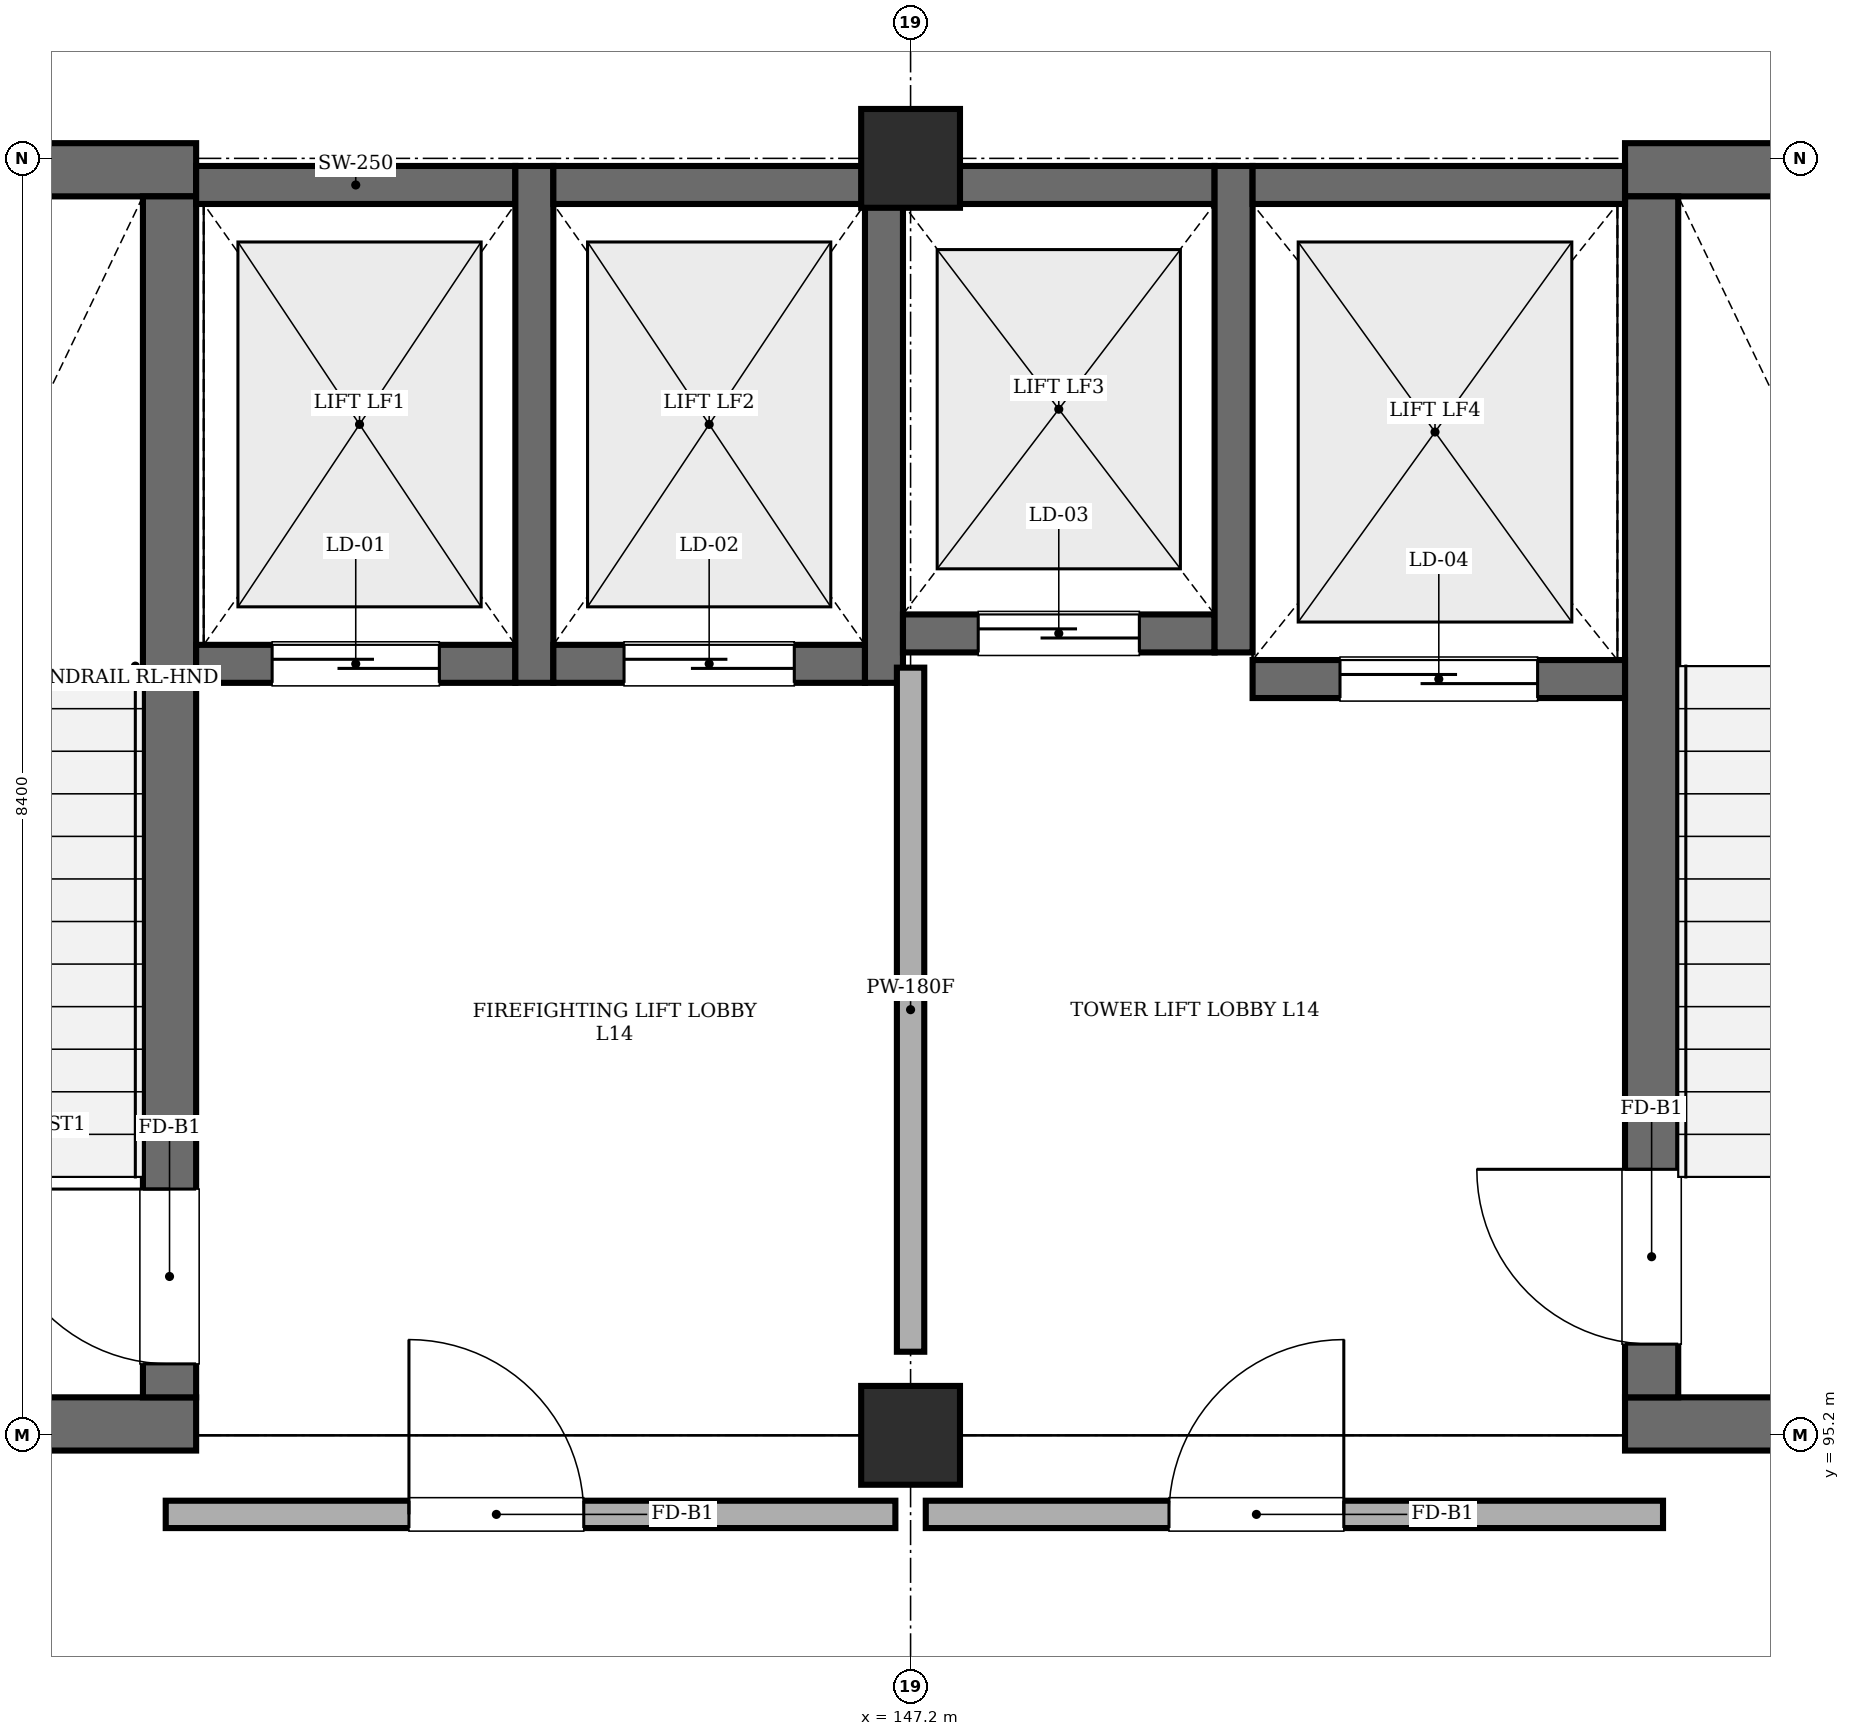
"""IFC4 building model, lengths in metres.
Left out: names, types, materials, properties, quantities, classifications, styles, units other than length and angle.
Written with IfcOpenShell. Run it as: python <this file> out.ifc"""

import sys

from ifc_helpers import new_model, si_unit, direction, frame, frame_2d, origin, origin_2d, place, context, subcontext, project, spatial, rectangle, extrude, element, fill, save


model = new_model("IFC4")
c1 = context("Model", 3, precision=1e-05, world=origin(), true_north=direction((0.0, 1.0)))
c2 = subcontext(c1, "Body", "Model", "MODEL_VIEW")
j1 = project(units=[si_unit("LENGTHUNIT", "METRE"), si_unit("PLANEANGLEUNIT", "RADIAN")], contexts=[c1])
p1 = place(None, origin())
s1 = spatial("IfcSite", under=j1, at=p1, CompositionType="ELEMENT")
p2 = place(p1, origin())
s2 = spatial("IfcBuilding", under=s1, at=p2, CompositionType="ELEMENT")
p3 = place(p2, frame((0.0, 0.0, 57.0)))
s3 = spatial("IfcBuildingStorey", under=s2, at=p3, CompositionType="ELEMENT", Elevation=57.0)
for number, where, z_axis, x_axis in (
    (1, (147.2, 95.2, 0.0), (0.0, 0.0, 1.0), (1.0, 0.0, 0.0)),
    (2, (147.2, 103.6, 0.0), (0.0, 0.0, 1.0), (1.0, 0.0, 0.0)),
):
    element("IfcColumn", number, at=place(p3, frame(where, z_axis=z_axis, x_axis=x_axis)), inside=s3, PredefinedType="COLUMN", context=c2, shape_type="SweptSolid", body=[
        extrude(rectangle(XDim=0.65, YDim=0.65, at=origin_2d()), origin(), (0.0, 0.0, 1.0), 4.02),
    ])
for number, where, z_axis, x_axis in (
    (3, (138.7, 95.275, 0.0), (0.0, 0.0, 1.0), (1.0, 0.0, 0.0)),
    (4, (138.7, 103.525, 0.0), (0.0, 0.0, 1.0), (1.0, 0.0, 0.0)),
):
    element("IfcWall", number, at=place(p3, frame(where, z_axis=z_axis, x_axis=x_axis)), inside=s3, PredefinedType="SHEAR", context=c2, shape_type="SweptSolid", body=[
        extrude(rectangle(XDim=3.8, YDim=0.35, at=frame_2d((1.9, 0.0))), origin(), (0.0, 0.0, 1.0), 4.02),
    ])
p4 = place(p3, frame((142.325, 95.45, 0.0), z_axis=(0.0, 0.0, 1.0), x_axis=(0.0, 1.0, 0.0)))
e5 = element("IfcWall", 5, at=p4, inside=s3, PredefinedType="SHEAR", context=c2, shape_type="SweptSolid", body=[
    extrude(rectangle(XDim=7.9, YDim=0.35, at=frame_2d((3.95, 0.0))), origin(), (0.0, 0.0, 1.0), 4.02),
])
p5 = place(p4, frame((0.22, 0.0, 0.0)))
e6 = element("IfcOpeningElement", 6, at=p5, cuts=e5, PredefinedType="OPENING", context=c2, shape_type="SweptSolid", body=[
    extrude(rectangle(XDim=1.15, YDim=2.15, at=frame_2d((0.575, 1.075))), frame((0.0, 0.185, 0.0), z_axis=(0.0, -1.0, 0.0), x_axis=(1.0, 0.0, 0.0)), (0.0, 0.0, 1.0), 0.37),
])
for number, where, z_axis, x_axis in (
    (7, (151.9, 95.275, 0.0), (0.0, 0.0, 1.0), (1.0, 0.0, 0.0)),
    (8, (151.9, 103.525, 0.0), (0.0, 0.0, 1.0), (1.0, 0.0, 0.0)),
):
    element("IfcWall", number, at=place(p3, frame(where, z_axis=z_axis, x_axis=x_axis)), inside=s3, PredefinedType="SHEAR", context=c2, shape_type="SweptSolid", body=[
        extrude(rectangle(XDim=3.8, YDim=0.35, at=frame_2d((1.9, 0.0))), origin(), (0.0, 0.0, 1.0), 4.02),
    ])
p6 = place(p3, frame((152.075, 95.45, 0.0), z_axis=(0.0, 0.0, 1.0), x_axis=(0.0, 1.0, 0.0)))
e9 = element("IfcWall", 9, at=p6, inside=s3, PredefinedType="SHEAR", context=c2, shape_type="SweptSolid", body=[
    extrude(rectangle(XDim=7.9, YDim=0.35, at=frame_2d((3.95, 0.0))), origin(), (0.0, 0.0, 1.0), 4.02),
])
p7 = place(p6, frame((0.35, 0.0, 0.0)))
e10 = element("IfcOpeningElement", 10, at=p7, cuts=e9, PredefinedType="OPENING", context=c2, shape_type="SweptSolid", body=[
    extrude(rectangle(XDim=1.15, YDim=2.15, at=frame_2d((0.575, 1.075))), frame((0.0, 0.185, 0.0), z_axis=(0.0, -1.0, 0.0), x_axis=(1.0, 0.0, 0.0)), (0.0, 0.0, 1.0), 0.37),
])
p8 = place(p3, frame((142.5, 100.275, 0.0), z_axis=(0.0, 0.0, 1.0), x_axis=(1.0, 0.0, 0.0)))
e11 = element("IfcWall", 11, at=p8, inside=s3, PredefinedType="SHEAR", context=c2, shape_type="SweptSolid", body=[
    extrude(rectangle(XDim=2.1, YDim=0.25, at=frame_2d((1.05, 0.0))), origin(), (0.0, 0.0, 1.0), 4.02),
])
p9 = place(p8, frame((0.5, 0.0, 0.0)))
e12 = element("IfcOpeningElement", 12, at=p9, cuts=e11, PredefinedType="OPENING", context=c2, shape_type="SweptSolid", body=[
    extrude(rectangle(XDim=1.1, YDim=2.15, at=frame_2d((0.55, 1.075))), frame((0.0, 0.135, 0.0), z_axis=(0.0, -1.0, 0.0), x_axis=(1.0, 0.0, 0.0)), (0.0, 0.0, 1.0), 0.27),
])
p10 = place(p3, frame((142.5, 103.425, 0.0), z_axis=(0.0, 0.0, 1.0), x_axis=(1.0, 0.0, 0.0)))
e13 = element("IfcWall", 13, at=p10, inside=s3, PredefinedType="SHEAR", context=c2, shape_type="SweptSolid", body=[
    extrude(rectangle(XDim=2.1, YDim=0.25, at=frame_2d((1.05, 0.0))), origin(), (0.0, 0.0, 1.0), 4.02),
])
p11 = place(p3, frame((144.725, 100.15, 0.0), z_axis=(0.0, 0.0, 1.0), x_axis=(0.0, 1.0, 0.0)))
e14 = element("IfcWall", 14, at=p11, inside=s3, PredefinedType="SHEAR", context=c2, shape_type="SweptSolid", body=[
    extrude(rectangle(XDim=3.4, YDim=0.25, at=frame_2d((1.7, 0.0))), origin(), (0.0, 0.0, 1.0), 4.02),
])
p12 = place(p3, frame((144.85, 100.275, 0.0), z_axis=(0.0, 0.0, 1.0), x_axis=(1.0, 0.0, 0.0)))
e15 = element("IfcWall", 15, at=p12, inside=s3, PredefinedType="SHEAR", context=c2, shape_type="SweptSolid", body=[
    extrude(rectangle(XDim=2.05, YDim=0.25, at=frame_2d((1.025, 0.0))), origin(), (0.0, 0.0, 1.0), 4.02),
])
p13 = place(p12, frame((0.465, 0.0, 0.0)))
e16 = element("IfcOpeningElement", 16, at=p13, cuts=e15, PredefinedType="OPENING", context=c2, shape_type="SweptSolid", body=[
    extrude(rectangle(XDim=1.12, YDim=2.15, at=frame_2d((0.56, 1.075))), frame((0.0, 0.135, 0.0), z_axis=(0.0, -1.0, 0.0), x_axis=(1.0, 0.0, 0.0)), (0.0, 0.0, 1.0), 0.27),
])
p14 = place(p3, frame((144.85, 103.425, 0.0), z_axis=(0.0, 0.0, 1.0), x_axis=(1.0, 0.0, 0.0)))
e17 = element("IfcWall", 17, at=p14, inside=s3, PredefinedType="SHEAR", context=c2, shape_type="SweptSolid", body=[
    extrude(rectangle(XDim=2.05, YDim=0.25, at=frame_2d((1.025, 0.0))), origin(), (0.0, 0.0, 1.0), 4.02),
])
p15 = place(p3, frame((147.025, 100.15, 0.0), z_axis=(0.0, 0.0, 1.0), x_axis=(0.0, 1.0, 0.0)))
e18 = element("IfcWall", 18, at=p15, inside=s3, PredefinedType="SHEAR", context=c2, shape_type="SweptSolid", body=[
    extrude(rectangle(XDim=3.4, YDim=0.25, at=frame_2d((1.7, 0.0))), origin(), (0.0, 0.0, 1.0), 4.02),
])
p16 = place(p3, frame((147.15, 100.475, 0.0), z_axis=(0.0, 0.0, 1.0), x_axis=(1.0, 0.0, 0.0)))
e19 = element("IfcWall", 19, at=p16, inside=s3, PredefinedType="SHEAR", context=c2, shape_type="SweptSolid", body=[
    extrude(rectangle(XDim=2.05, YDim=0.25, at=frame_2d((1.025, 0.0))), origin(), (0.0, 0.0, 1.0), 4.02),
])
p17 = place(p16, frame((0.495, 0.0, 0.0)))
e20 = element("IfcOpeningElement", 20, at=p17, cuts=e19, PredefinedType="OPENING", context=c2, shape_type="SweptSolid", body=[
    extrude(rectangle(XDim=1.06, YDim=2.15, at=frame_2d((0.53, 1.075))), frame((0.0, 0.135, 0.0), z_axis=(0.0, -1.0, 0.0), x_axis=(1.0, 0.0, 0.0)), (0.0, 0.0, 1.0), 0.27),
])
p18 = place(p3, frame((147.15, 103.425, 0.0), z_axis=(0.0, 0.0, 1.0), x_axis=(1.0, 0.0, 0.0)))
e21 = element("IfcWall", 21, at=p18, inside=s3, PredefinedType="SHEAR", context=c2, shape_type="SweptSolid", body=[
    extrude(rectangle(XDim=2.05, YDim=0.25, at=frame_2d((1.025, 0.0))), origin(), (0.0, 0.0, 1.0), 4.02),
])
p19 = place(p3, frame((149.325, 100.35, 0.0), z_axis=(0.0, 0.0, 1.0), x_axis=(0.0, 1.0, 0.0)))
e22 = element("IfcWall", 22, at=p19, inside=s3, PredefinedType="SHEAR", context=c2, shape_type="SweptSolid", body=[
    extrude(rectangle(XDim=3.2, YDim=0.25, at=frame_2d((1.6, 0.0))), origin(), (0.0, 0.0, 1.0), 4.02),
])
p20 = place(p3, frame((149.45, 100.175, 0.0), z_axis=(0.0, 0.0, 1.0), x_axis=(1.0, 0.0, 0.0)))
e23 = element("IfcWall", 23, at=p20, inside=s3, PredefinedType="SHEAR", context=c2, shape_type="SweptSolid", body=[
    extrude(rectangle(XDim=2.45, YDim=0.25, at=frame_2d((1.225, 0.0))), origin(), (0.0, 0.0, 1.0), 4.02),
])
p21 = place(p20, frame((0.575, 0.0, 0.0)))
e24 = element("IfcOpeningElement", 24, at=p21, cuts=e23, PredefinedType="OPENING", context=c2, shape_type="SweptSolid", body=[
    extrude(rectangle(XDim=1.3, YDim=2.25, at=frame_2d((0.65, 1.125))), frame((0.0, 0.135, 0.0), z_axis=(0.0, -1.0, 0.0), x_axis=(1.0, 0.0, 0.0)), (0.0, 0.0, 1.0), 0.27),
])
p22 = place(p3, frame((149.45, 103.425, 0.0), z_axis=(0.0, 0.0, 1.0), x_axis=(1.0, 0.0, 0.0)))
e25 = element("IfcWall", 25, at=p22, inside=s3, PredefinedType="SHEAR", context=c2, shape_type="SweptSolid", body=[
    extrude(rectangle(XDim=2.45, YDim=0.25, at=frame_2d((1.225, 0.0))), origin(), (0.0, 0.0, 1.0), 4.02),
])
p23 = place(p3, frame((142.3, 94.68, 0.0), z_axis=(0.0, 0.0, 1.0), x_axis=(1.0, 0.0, 0.0)))
e26 = element("IfcWall", 26, at=p23, inside=s3, PredefinedType="STANDARD", context=c2, shape_type="SweptSolid", body=[
    extrude(rectangle(XDim=4.8, YDim=0.18, at=frame_2d((2.4, 0.0))), origin(), (0.0, 0.0, 1.0), 4.02),
])
p24 = place(p23, frame((1.6, 0.0, 0.0)))
e27 = element("IfcOpeningElement", 27, at=p24, cuts=e26, PredefinedType="OPENING", context=c2, shape_type="SweptSolid", body=[
    extrude(rectangle(XDim=1.15, YDim=2.15, at=frame_2d((0.575, 1.075))), frame((0.0, 0.1, 0.0), z_axis=(0.0, -1.0, 0.0), x_axis=(1.0, 0.0, 0.0)), (0.0, 0.0, 1.0), 0.2),
])
p25 = place(p3, frame((147.3, 94.68, 0.0), z_axis=(0.0, 0.0, 1.0), x_axis=(1.0, 0.0, 0.0)))
e28 = element("IfcWall", 28, at=p25, inside=s3, PredefinedType="STANDARD", context=c2, shape_type="SweptSolid", body=[
    extrude(rectangle(XDim=4.85, YDim=0.18, at=frame_2d((2.425, 0.0))), origin(), (0.0, 0.0, 1.0), 4.02),
])
p26 = place(p25, frame((1.6, 0.0, 0.0)))
e29 = element("IfcOpeningElement", 29, at=p26, cuts=e28, PredefinedType="OPENING", context=c2, shape_type="SweptSolid", body=[
    extrude(rectangle(XDim=1.15, YDim=2.15, at=frame_2d((0.575, 1.075))), frame((0.0, 0.1, 0.0), z_axis=(0.0, -1.0, 0.0), x_axis=(1.0, 0.0, 0.0)), (0.0, 0.0, 1.0), 0.2),
])
p27 = place(p3, frame((147.2, 95.75, 0.0), z_axis=(0.0, 0.0, 1.0), x_axis=(0.0, 1.0, 0.0)))
e30 = element("IfcWall", 30, at=p27, inside=s3, PredefinedType="STANDARD", context=c2, shape_type="SweptSolid", body=[
    extrude(rectangle(XDim=4.5, YDim=0.18, at=frame_2d((2.25, 0.0))), origin(), (0.0, 0.0, 1.0), 3.32),
])
p28 = place(p24, origin())
e31 = element("IfcDoor", 31, at=p28, inside=s3, OperationType="SINGLE_SWING_LEFT", PredefinedType="DOOR", context=c2, shape_type="SweptSolid", body=[
    extrude(rectangle(XDim=1.15, YDim=2.15, at=frame_2d((0.575, 1.075))), frame((0.0, 0.025, 0.0), z_axis=(0.0, -1.0, 0.0), x_axis=(1.0, 0.0, 0.0)), (0.0, 0.0, 1.0), 0.05),
])
fill(e27, e31)
p29 = place(p26, origin())
e32 = element("IfcDoor", 32, at=p29, inside=s3, OperationType="SINGLE_SWING_RIGHT", PredefinedType="DOOR", context=c2, shape_type="SweptSolid", body=[
    extrude(rectangle(XDim=1.15, YDim=2.15, at=frame_2d((0.575, 1.075))), frame((0.0, 0.025, 0.0), z_axis=(0.0, -1.0, 0.0), x_axis=(1.0, 0.0, 0.0)), (0.0, 0.0, 1.0), 0.05),
])
fill(e29, e32)
p30 = place(p5, origin())
e33 = element("IfcDoor", 33, at=p30, inside=s3, OperationType="SINGLE_SWING_RIGHT", PredefinedType="DOOR", context=c2, shape_type="SweptSolid", body=[
    extrude(rectangle(XDim=1.15, YDim=2.15, at=frame_2d((0.575, 1.075))), frame((0.0, 0.025, 0.0), z_axis=(0.0, -1.0, 0.0), x_axis=(1.0, 0.0, 0.0)), (0.0, 0.0, 1.0), 0.05),
])
fill(e6, e33)
p31 = place(p7, origin())
e34 = element("IfcDoor", 34, at=p31, inside=s3, OperationType="SINGLE_SWING_RIGHT", PredefinedType="DOOR", context=c2, shape_type="SweptSolid", body=[
    extrude(rectangle(XDim=1.15, YDim=2.15, at=frame_2d((0.575, 1.075))), frame((0.0, 0.025, 0.0), z_axis=(0.0, -1.0, 0.0), x_axis=(1.0, 0.0, 0.0)), (0.0, 0.0, 1.0), 0.05),
])
fill(e10, e34)
p32 = place(p9, origin())
e35 = element("IfcDoor", 35, at=p32, inside=s3, OperationType="SLIDING_TO_LEFT", PredefinedType="DOOR", context=c2, shape_type="SweptSolid", body=[
    extrude(rectangle(XDim=1.1, YDim=2.15, at=frame_2d((0.55, 1.075))), frame((0.0, 0.025, 0.0), z_axis=(0.0, -1.0, 0.0), x_axis=(1.0, 0.0, 0.0)), (0.0, 0.0, 1.0), 0.05),
])
fill(e12, e35)
p33 = place(p13, origin())
e36 = element("IfcDoor", 36, at=p33, inside=s3, OperationType="SLIDING_TO_LEFT", PredefinedType="DOOR", context=c2, shape_type="SweptSolid", body=[
    extrude(rectangle(XDim=1.12, YDim=2.15, at=frame_2d((0.56, 1.075))), frame((0.0, 0.025, 0.0), z_axis=(0.0, -1.0, 0.0), x_axis=(1.0, 0.0, 0.0)), (0.0, 0.0, 1.0), 0.05),
])
fill(e16, e36)
p34 = place(p17, origin())
e37 = element("IfcDoor", 37, at=p34, inside=s3, OperationType="SLIDING_TO_LEFT", PredefinedType="DOOR", context=c2, shape_type="SweptSolid", body=[
    extrude(rectangle(XDim=1.06, YDim=2.15, at=frame_2d((0.53, 1.075))), frame((0.0, 0.025, 0.0), z_axis=(0.0, -1.0, 0.0), x_axis=(1.0, 0.0, 0.0)), (0.0, 0.0, 1.0), 0.05),
])
fill(e20, e37)
p35 = place(p21, origin())
e38 = element("IfcDoor", 38, at=p35, inside=s3, OperationType="SLIDING_TO_LEFT", PredefinedType="DOOR", context=c2, shape_type="SweptSolid", body=[
    extrude(rectangle(XDim=1.3, YDim=2.25, at=frame_2d((0.65, 1.125))), frame((0.0, 0.025, 0.0), z_axis=(0.0, -1.0, 0.0), x_axis=(1.0, 0.0, 0.0)), (0.0, 0.0, 1.0), 0.05),
])
fill(e24, e38)
save(model, sys.argv[1])
